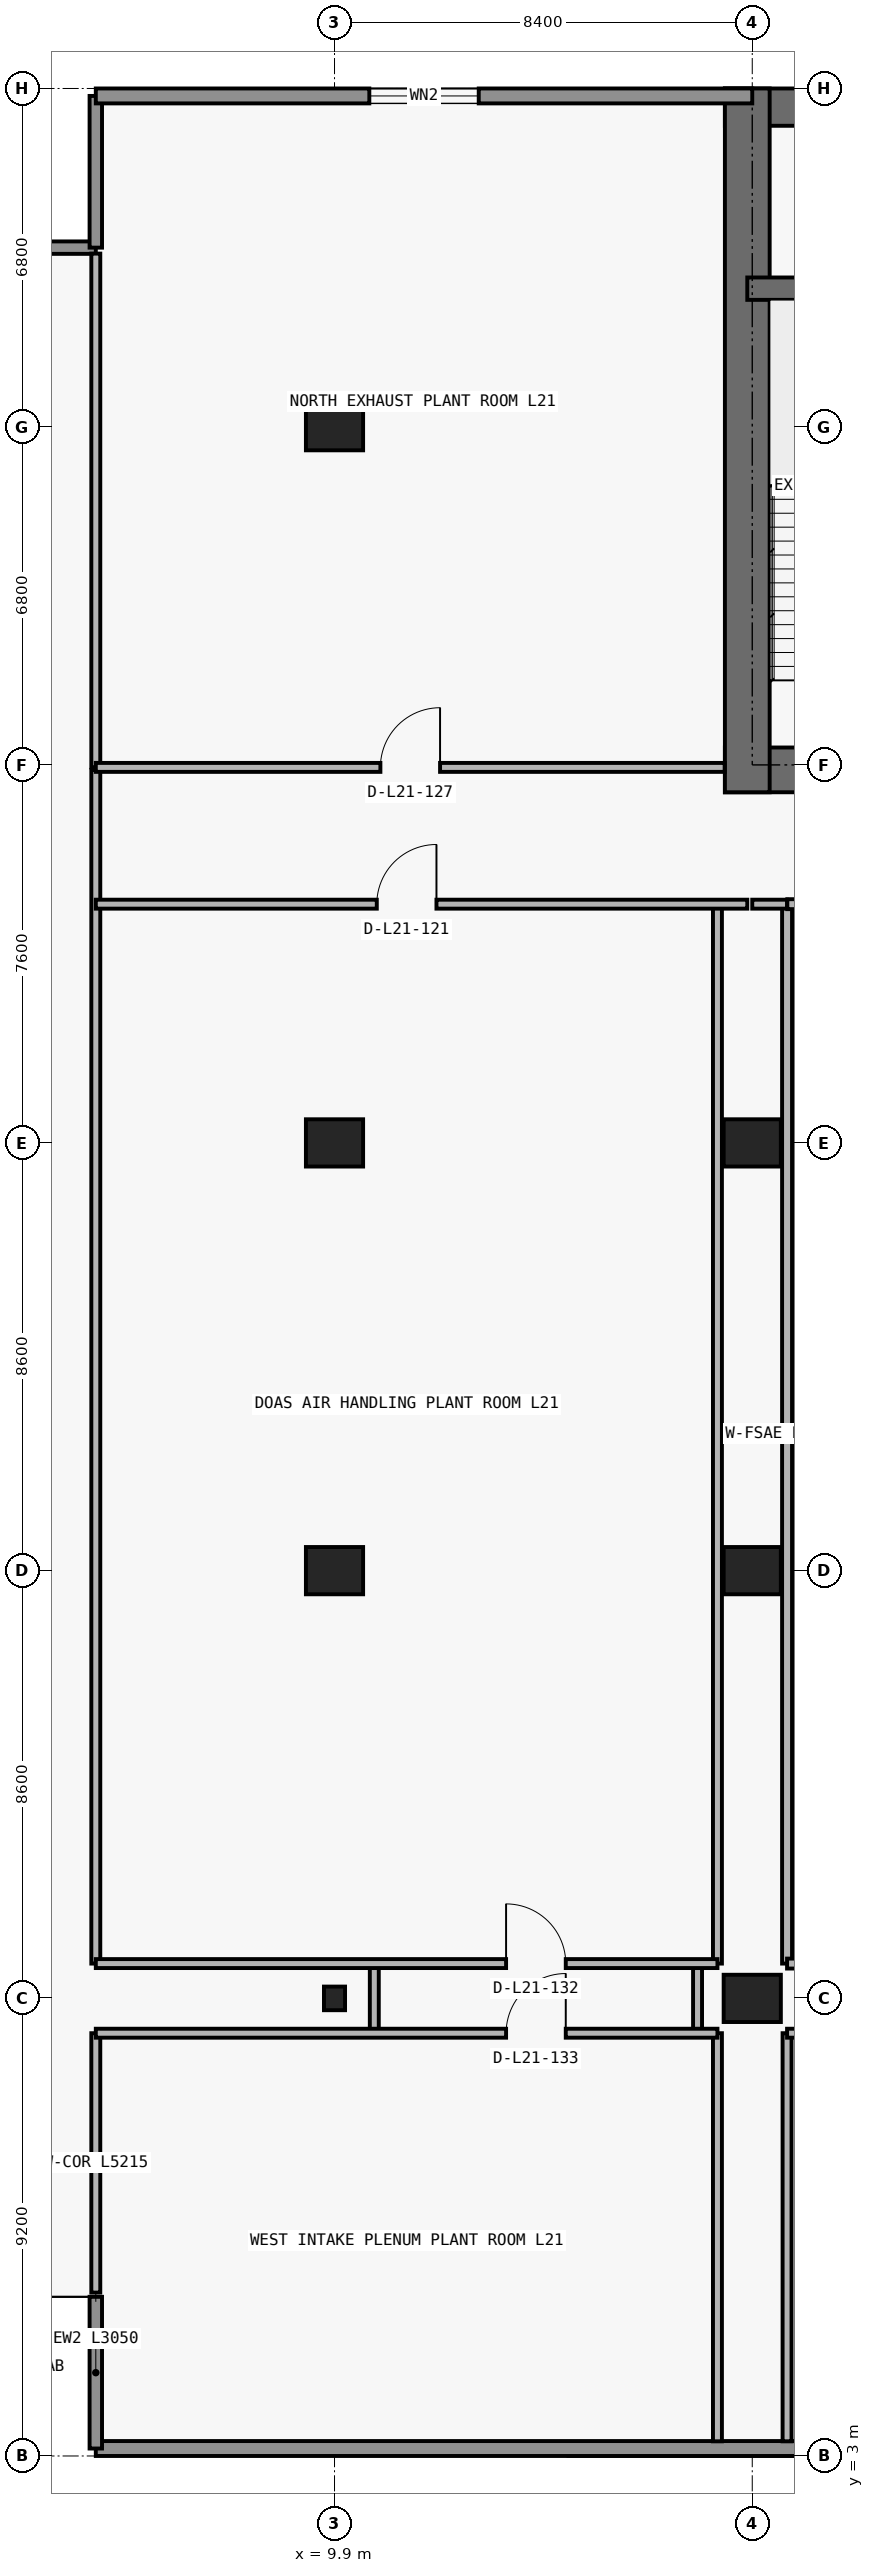
"""IFC4 building model, lengths in metres.
Left out: names, types, materials, properties, quantities, classifications, styles, units other than length and angle.
Written with IfcOpenShell. Run it as: python <this file> out.ifc"""

import sys

from ifc_helpers import new_model, si_unit, direction, frame, frame_2d, origin, origin_2d, place, context, subcontext, project, spatial, rectangle, i_section, extrude, element, fill, save


model = new_model("IFC4")
c1 = context("Model", 3, precision=1e-05, world=origin(), true_north=direction((0.0, 1.0)))
c2 = subcontext(c1, "Body", "Model", "MODEL_VIEW")
j1 = project(units=[si_unit("LENGTHUNIT", "METRE"), si_unit("PLANEANGLEUNIT", "RADIAN")], contexts=[c1])
p1 = place(None, origin())
s1 = spatial("IfcSite", under=j1, at=p1, CompositionType="ELEMENT")
p2 = place(p1, origin())
s2 = spatial("IfcBuilding", under=s1, at=p2, CompositionType="ELEMENT")
p3 = place(p2, frame((0.0, 0.0, 79.5)))
s3 = spatial("IfcBuildingStorey", under=s2, at=p3, CompositionType="ELEMENT", Elevation=79.5)
p4 = place(p3, frame((9.9, 12.2, 0.0), z_axis=(0.0, 0.0, 1.0), x_axis=(1.0, 0.0, 0.0)))
e1 = element("IfcColumn", 1, at=p4, inside=s3, PredefinedType="COLUMN", context=c2, shape_type="SweptSolid", body=[
    extrude(i_section(OverallWidth=0.424, OverallDepth=0.475, WebThickness=0.048, FlangeThickness=0.077, FilletRadius=0.015, at=origin_2d()), origin(), (0.0, 0.0, 1.0), 4.85),
])
for number, where, z_axis, x_axis in (
    (2, (18.3, 12.2, 0.0), (0.0, 0.0, 1.0), (1.0, 0.0, 0.0)),
    (3, (9.9, 20.8, 0.0), (0.0, 0.0, 1.0), (1.0, 0.0, 0.0)),
    (4, (18.3, 20.8, 0.0), (0.0, 0.0, 1.0), (1.0, 0.0, 0.0)),
    (5, (9.9, 29.4, 0.0), (0.0, 0.0, 1.0), (1.0, 0.0, 0.0)),
    (6, (18.3, 29.4, 0.0), (0.0, 0.0, 1.0), (1.0, 0.0, 0.0)),
    (7, (9.9, 43.8, 0.0), (0.0, 0.0, 1.0), (1.0, 0.0, 0.0)),
):
    element("IfcColumn", number, at=place(p3, frame(where, z_axis=z_axis, x_axis=x_axis)), inside=s3, PredefinedType="COLUMN", context=c2, shape_type="SweptSolid", body=[
        extrude(rectangle(XDim=1.15, YDim=0.95, at=origin_2d()), origin(), (0.0, 0.0, 1.0), 4.85),
    ])
p5 = place(p3, frame((17.75, 36.9, 0.0), z_axis=(0.0, 0.0, 1.0), x_axis=(1.0, 0.0, 0.0)))
e8 = element("IfcWall", 8, at=p5, inside=s3, PredefinedType="SHEAR", context=c2, shape_type="SweptSolid", body=[
    extrude(rectangle(XDim=42.3, YDim=0.9, at=frame_2d((21.15, 0.0))), origin(), (0.0, 0.0, 1.0), 4.85),
])
p6 = place(p5, frame((14.55, 0.0, 0.0)))
e9 = element("IfcOpeningElement", 9, at=p6, cuts=e8, PredefinedType="OPENING", context=c2, shape_type="SweptSolid", body=[
    extrude(rectangle(XDim=1.1, YDim=2.15, at=frame_2d((0.55, 1.075))), frame((0.0, 0.46, 0.0), z_axis=(0.0, -1.0, 0.0), x_axis=(1.0, 0.0, 0.0)), (0.0, 0.0, 1.0), 0.92),
])
p7 = place(p5, frame((6.4, 0.0, 0.0)))
e10 = element("IfcOpeningElement", 10, at=p7, cuts=e8, PredefinedType="OPENING", context=c2, shape_type="SweptSolid", body=[
    extrude(rectangle(XDim=1.05, YDim=2.15, at=frame_2d((0.525, 1.075))), frame((0.0, 0.46, 0.0), z_axis=(0.0, -1.0, 0.0), x_axis=(1.0, 0.0, 0.0)), (0.0, 0.0, 1.0), 0.92),
])
p8 = place(p5, frame((34.9, 0.0, 0.0)))
e11 = element("IfcOpeningElement", 11, at=p8, cuts=e8, PredefinedType="OPENING", context=c2, shape_type="SweptSolid", body=[
    extrude(rectangle(XDim=1.05, YDim=2.15, at=frame_2d((0.525, 1.075))), frame((0.0, 0.46, 0.0), z_axis=(0.0, -1.0, 0.0), x_axis=(1.0, 0.0, 0.0)), (0.0, 0.0, 1.0), 0.92),
])
p9 = place(p5, frame((11.012, 0.0, 0.0)))
e12 = element("IfcOpeningElement", 12, at=p9, cuts=e8, PredefinedType="OPENING", context=c2, shape_type="SweptSolid", body=[
    extrude(rectangle(XDim=1.05, YDim=2.15, at=frame_2d((0.525, 1.075))), frame((0.0, 0.46, 0.0), z_axis=(0.0, -1.0, 0.0), x_axis=(1.0, 0.0, 0.0)), (0.0, 0.0, 1.0), 0.92),
])
p10 = place(p5, frame((24.25, 0.0, 0.0)))
e13 = element("IfcOpeningElement", 13, at=p10, cuts=e8, PredefinedType="OPENING", context=c2, shape_type="SweptSolid", body=[
    extrude(rectangle(XDim=1.05, YDim=2.15, at=frame_2d((0.525, 1.075))), frame((0.0, 0.46, 0.0), z_axis=(0.0, -1.0, 0.0), x_axis=(1.0, 0.0, 0.0)), (0.0, 0.0, 1.0), 0.92),
])
p11 = place(p3, frame((17.75, 50.225, 0.0), z_axis=(0.0, 0.0, 1.0), x_axis=(1.0, 0.0, 0.0)))
e14 = element("IfcWall", 14, at=p11, inside=s3, PredefinedType="SHEAR", context=c2, shape_type="SweptSolid", body=[
    extrude(rectangle(XDim=42.3, YDim=0.75, at=frame_2d((21.15, 0.0))), origin(), (0.0, 0.0, 1.0), 4.85),
])
p12 = place(p3, frame((18.2, 36.45, 0.0), z_axis=(0.0, 0.0, 1.0), x_axis=(0.0, 1.0, 0.0)))
e15 = element("IfcWall", 15, at=p12, inside=s3, PredefinedType="SHEAR", context=c2, shape_type="SweptSolid", body=[
    extrude(rectangle(XDim=14.15, YDim=0.9, at=frame_2d((7.075, 0.0))), origin(), (0.0, 0.0, 1.0), 4.85),
])
p13 = place(p3, frame((18.2, 46.575, 0.0), z_axis=(0.0, 0.0, 1.0), x_axis=(1.0, 0.0, 0.0)))
e16 = element("IfcWall", 16, at=p13, inside=s3, PredefinedType="SHEAR", context=c2, shape_type="SweptSolid", body=[
    extrude(rectangle(XDim=41.4, YDim=0.45, at=frame_2d((20.7, 0.0))), origin(), (0.0, 0.0, 1.0), 4.85),
])
p14 = place(p13, frame((7.7, 0.0, 0.0)))
e17 = element("IfcOpeningElement", 17, at=p14, cuts=e16, PredefinedType="OPENING", context=c2, shape_type="SweptSolid", body=[
    extrude(rectangle(XDim=1.0, YDim=2.2, at=frame_2d((0.5, 1.1))), frame((0.0, 0.235, 0.0), z_axis=(0.0, -1.0, 0.0), x_axis=(1.0, 0.0, 0.0)), (0.0, 0.0, 1.0), 0.47),
])
p15 = place(p13, frame((32.725, 0.0, 0.0)))
e18 = element("IfcOpeningElement", 18, at=p15, cuts=e16, PredefinedType="OPENING", context=c2, shape_type="SweptSolid", body=[
    extrude(rectangle(XDim=1.05, YDim=2.15, at=frame_2d((0.525, 1.075))), frame((0.0, 0.235, 0.0), z_axis=(0.0, -1.0, 0.0), x_axis=(1.0, 0.0, 0.0)), (0.0, 0.0, 1.0), 0.47),
])
p16 = place(p3, frame((72.7, 3.15, 0.0), z_axis=(0.0, 0.0, 1.0), x_axis=(-1.0, 0.0, 0.0)))
e19 = element("IfcWall", 19, at=p16, inside=s3, PredefinedType="STANDARD", context=c2, shape_type="SweptSolid", body=[
    extrude(rectangle(XDim=67.6, YDim=0.3, at=frame_2d((33.8, 0.0))), origin(), (0.0, 0.0, 1.0), 4.85),
])
p17 = place(p3, frame((5.1, 6.2, 0.0), z_axis=(0.0, 0.0, 1.0), x_axis=(0.0, -1.0, 0.0)))
e20 = element("IfcWall", 20, at=p17, inside=s3, PredefinedType="ELEMENTEDWALL", context=c2, shape_type="SweptSolid", body=[
    extrude(rectangle(XDim=3.05, YDim=0.25, at=frame_2d((1.525, 0.0))), origin(), (0.0, 0.0, 1.0), 4.85),
])
p18 = place(p3, frame((1.65, 47.4, 0.0), z_axis=(0.0, 0.0, 1.0), x_axis=(1.0, 0.0, 0.0)))
e21 = element("IfcWall", 21, at=p18, inside=s3, PredefinedType="ELEMENTEDWALL", context=c2, shape_type="SweptSolid", body=[
    extrude(rectangle(XDim=3.45, YDim=0.25, at=frame_2d((1.725, 0.0))), origin(), (0.0, 0.0, 1.0), 4.85),
])
p19 = place(p3, frame((5.1, 47.4, 0.0), z_axis=(0.0, 0.0, 1.0), x_axis=(0.0, 1.0, 0.0)))
e22 = element("IfcWall", 22, at=p19, inside=s3, PredefinedType="ELEMENTEDWALL", context=c2, shape_type="SweptSolid", body=[
    extrude(rectangle(XDim=3.05, YDim=0.25, at=frame_2d((1.525, 0.0))), origin(), (0.0, 0.0, 1.0), 4.85),
])
p20 = place(p3, frame((5.1, 50.45, 0.0), z_axis=(0.0, 0.0, 1.0), x_axis=(1.0, 0.0, 0.0)))
e23 = element("IfcWall", 23, at=p20, inside=s3, PredefinedType="STANDARD", context=c2, shape_type="SweptSolid", body=[
    extrude(rectangle(XDim=13.2, YDim=0.3, at=frame_2d((6.6, 0.0))), origin(), (0.0, 0.0, 1.0), 4.85),
])
p21 = place(p20, frame((5.5, 0.0, 0.85)))
e24 = element("IfcOpeningElement", 24, at=p21, cuts=e23, PredefinedType="OPENING", context=c2, shape_type="SweptSolid", body=[
    extrude(rectangle(XDim=2.2, YDim=1.55, at=frame_2d((1.1, 0.775))), frame((0.0, 0.16, 0.0), z_axis=(0.0, -1.0, 0.0), x_axis=(1.0, 0.0, 0.0)), (0.0, 0.0, 1.0), 0.32),
])
p22 = place(p3, frame((5.1, 6.285, 0.0), z_axis=(0.0, 0.0, 1.0), x_axis=(0.0, 1.0, 0.0)))
e25 = element("IfcWall", 25, at=p22, inside=s3, PredefinedType="PARTITIONING", context=c2, shape_type="SweptSolid", body=[
    extrude(rectangle(XDim=5.215, YDim=0.18, at=frame_2d((2.607, 0.0))), origin(), (0.0, 0.0, 1.0), 4.85),
])
p23 = place(p3, frame((5.1, 12.9, 0.0), z_axis=(0.0, 0.0, 1.0), x_axis=(0.0, 1.0, 0.0)))
e26 = element("IfcWall", 26, at=p23, inside=s3, PredefinedType="PARTITIONING", context=c2, shape_type="SweptSolid", body=[
    extrude(rectangle(XDim=24.0, YDim=0.18, at=frame_2d((12.0, 0.0))), origin(), (0.0, 0.0, 1.0), 4.85),
])
p24 = place(p3, frame((5.1, 36.95, 0.0), z_axis=(0.0, 0.0, 1.0), x_axis=(0.0, 1.0, 0.0)))
e27 = element("IfcWall", 27, at=p24, inside=s3, PredefinedType="PARTITIONING", context=c2, shape_type="SweptSolid", body=[
    extrude(rectangle(XDim=10.33, YDim=0.18, at=frame_2d((5.165, 0.0))), origin(), (0.0, 0.0, 1.0), 4.85),
])
for number, where, z_axis, x_axis in (
    (28, (10.7, 11.5, 0.0), (0.0, 0.0, 1.0), (0.0, 1.0, 0.0)),
    (29, (17.2, 11.5, 0.0), (0.0, 0.0, 1.0), (0.0, 1.0, 0.0)),
):
    element("IfcWall", number, at=place(p3, frame(where, z_axis=z_axis, x_axis=x_axis)), inside=s3, PredefinedType="PARTITIONING", context=c2, shape_type="SweptSolid", body=[
        extrude(rectangle(XDim=1.4, YDim=0.18, at=frame_2d((0.7, 0.0))), origin(), (0.0, 0.0, 1.0), 4.85),
    ])
p25 = place(p3, frame((17.6, 3.295, 0.0), z_axis=(0.0, 0.0, 1.0), x_axis=(0.0, 1.0, 0.0)))
e30 = element("IfcWall", 30, at=p25, inside=s3, PredefinedType="PARTITIONING", context=c2, shape_type="SweptSolid", body=[
    extrude(rectangle(XDim=8.205, YDim=0.18, at=frame_2d((4.103, 0.0))), origin(), (0.0, 0.0, 1.0), 4.85),
])
p26 = place(p3, frame((17.6, 12.9, 0.0), z_axis=(0.0, 0.0, 1.0), x_axis=(0.0, 1.0, 0.0)))
e31 = element("IfcWall", 31, at=p26, inside=s3, PredefinedType="PARTITIONING", context=c2, shape_type="SweptSolid", body=[
    extrude(rectangle(XDim=21.3, YDim=0.18, at=frame_2d((10.65, 0.0))), origin(), (0.0, 0.0, 1.0), 4.85),
])
p27 = place(p3, frame((19.0, 3.295, 0.0), z_axis=(0.0, 0.0, 1.0), x_axis=(0.0, 1.0, 0.0)))
e32 = element("IfcWall", 32, at=p27, inside=s3, PredefinedType="PARTITIONING", context=c2, shape_type="SweptSolid", body=[
    extrude(rectangle(XDim=8.205, YDim=0.18, at=frame_2d((4.103, 0.0))), origin(), (0.0, 0.0, 1.0), 4.85),
])
p28 = place(p3, frame((19.0, 12.9, 0.0), z_axis=(0.0, 0.0, 1.0), x_axis=(0.0, 1.0, 0.0)))
e33 = element("IfcWall", 33, at=p28, inside=s3, PredefinedType="PARTITIONING", context=c2, shape_type="SweptSolid", body=[
    extrude(rectangle(XDim=21.3, YDim=0.2, at=frame_2d((10.65, 0.0))), origin(), (0.0, 0.0, 1.0), 4.85),
])
p29 = place(p3, frame((5.1, 11.5, 0.0), z_axis=(0.0, 0.0, 1.0), x_axis=(1.0, 0.0, 0.0)))
e34 = element("IfcWall", 34, at=p29, inside=s3, PredefinedType="PARTITIONING", context=c2, shape_type="SweptSolid", body=[
    extrude(rectangle(XDim=12.5, YDim=0.18, at=frame_2d((6.25, 0.0))), origin(), (0.0, 0.0, 1.0), 4.85),
])
p30 = place(p29, frame((8.25, 0.0, 0.0)))
e35 = element("IfcOpeningElement", 35, at=p30, cuts=e34, PredefinedType="OPENING", context=c2, shape_type="SweptSolid", body=[
    extrude(rectangle(XDim=1.2, YDim=2.2, at=frame_2d((0.6, 1.1))), frame((0.0, 0.1, 0.0), z_axis=(0.0, -1.0, 0.0), x_axis=(1.0, 0.0, 0.0)), (0.0, 0.0, 1.0), 0.2),
])
p31 = place(p3, frame((19.0, 11.5, 0.0), z_axis=(0.0, 0.0, 1.0), x_axis=(1.0, 0.0, 0.0)))
e36 = element("IfcWall", 36, at=p31, inside=s3, PredefinedType="PARTITIONING", context=c2, shape_type="SweptSolid", body=[
    extrude(rectangle(XDim=39.8, YDim=0.18, at=frame_2d((19.9, 0.0))), origin(), (0.0, 0.0, 1.0), 4.85),
])
p32 = place(p31, frame((19.3, 0.0, 0.0)))
e37 = element("IfcOpeningElement", 37, at=p32, cuts=e36, PredefinedType="OPENING", context=c2, shape_type="SweptSolid", body=[
    extrude(rectangle(XDim=1.2, YDim=2.2, at=frame_2d((0.6, 1.1))), frame((0.0, 0.1, 0.0), z_axis=(0.0, -1.0, 0.0), x_axis=(1.0, 0.0, 0.0)), (0.0, 0.0, 1.0), 0.2),
])
p33 = place(p3, frame((5.1, 12.9, 0.0), z_axis=(0.0, 0.0, 1.0), x_axis=(1.0, 0.0, 0.0)))
e38 = element("IfcWall", 38, at=p33, inside=s3, PredefinedType="PARTITIONING", context=c2, shape_type="SweptSolid", body=[
    extrude(rectangle(XDim=12.5, YDim=0.18, at=frame_2d((6.25, 0.0))), origin(), (0.0, 0.0, 1.0), 4.85),
])
p34 = place(p33, frame((8.25, 0.0, 0.0)))
e39 = element("IfcOpeningElement", 39, at=p34, cuts=e38, PredefinedType="OPENING", context=c2, shape_type="SweptSolid", body=[
    extrude(rectangle(XDim=1.2, YDim=2.2, at=frame_2d((0.6, 1.1))), frame((0.0, 0.1, 0.0), z_axis=(0.0, -1.0, 0.0), x_axis=(1.0, 0.0, 0.0)), (0.0, 0.0, 1.0), 0.2),
])
p35 = place(p3, frame((19.0, 12.9, 0.0), z_axis=(0.0, 0.0, 1.0), x_axis=(1.0, 0.0, 0.0)))
e40 = element("IfcWall", 40, at=p35, inside=s3, PredefinedType="PARTITIONING", context=c2, shape_type="SweptSolid", body=[
    extrude(rectangle(XDim=16.1, YDim=0.2, at=frame_2d((8.05, 0.0))), origin(), (0.0, 0.0, 1.0), 4.85),
])
p36 = place(p3, frame((5.1, 34.2, 0.0), z_axis=(0.0, 0.0, 1.0), x_axis=(1.0, 0.0, 0.0)))
e41 = element("IfcWall", 41, at=p36, inside=s3, PredefinedType="PARTITIONING", context=c2, shape_type="SweptSolid", body=[
    extrude(rectangle(XDim=13.1, YDim=0.18, at=frame_2d((6.55, 0.0))), origin(), (0.0, 0.0, 1.0), 4.85),
])
p37 = place(p36, frame((5.65, 0.0, 0.0)))
e42 = element("IfcOpeningElement", 42, at=p37, cuts=e41, PredefinedType="OPENING", context=c2, shape_type="SweptSolid", body=[
    extrude(rectangle(XDim=1.2, YDim=2.2, at=frame_2d((0.6, 1.1))), frame((0.0, 0.1, 0.0), z_axis=(0.0, -1.0, 0.0), x_axis=(1.0, 0.0, 0.0)), (0.0, 0.0, 1.0), 0.2),
])
p38 = place(p3, frame((18.3, 34.2, 0.0), z_axis=(0.0, 0.0, 1.0), x_axis=(1.0, 0.0, 0.0)))
e43 = element("IfcWall", 43, at=p38, inside=s3, PredefinedType="PARTITIONING", context=c2, shape_type="SweptSolid", body=[
    extrude(rectangle(XDim=0.7, YDim=0.18, at=frame_2d((0.35, 0.0))), origin(), (0.0, 0.0, 1.0), 4.85),
])
p39 = place(p3, frame((19.005, 34.2, 0.0), z_axis=(0.0, 0.0, 1.0), x_axis=(1.0, 0.0, 0.0)))
e44 = element("IfcWall", 44, at=p39, inside=s3, PredefinedType="PARTITIONING", context=c2, shape_type="SweptSolid", body=[
    extrude(rectangle(XDim=16.095, YDim=0.2, at=frame_2d((8.048, 0.0))), origin(), (0.0, 0.0, 1.0), 4.85),
])
p40 = place(p39, frame((7.522, 0.0, 0.0)))
e45 = element("IfcOpeningElement", 45, at=p40, cuts=e44, PredefinedType="OPENING", context=c2, shape_type="SweptSolid", body=[
    extrude(rectangle(XDim=1.05, YDim=2.15, at=frame_2d((0.525, 1.075))), frame((0.0, 0.11, 0.0), z_axis=(0.0, -1.0, 0.0), x_axis=(1.0, 0.0, 0.0)), (0.0, 0.0, 1.0), 0.22),
])
p41 = place(p3, frame((5.1, 36.95, 0.0), z_axis=(0.0, 0.0, 1.0), x_axis=(1.0, 0.0, 0.0)))
e46 = element("IfcWall", 46, at=p41, inside=s3, PredefinedType="PARTITIONING", context=c2, shape_type="SweptSolid", body=[
    extrude(rectangle(XDim=12.645, YDim=0.18, at=frame_2d((6.323, 0.0))), origin(), (0.0, 0.0, 1.0), 4.85),
])
p42 = place(p41, frame((5.722, 0.0, 0.0)))
e47 = element("IfcOpeningElement", 47, at=p42, cuts=e46, PredefinedType="OPENING", context=c2, shape_type="SweptSolid", body=[
    extrude(rectangle(XDim=1.2, YDim=2.2, at=frame_2d((0.6, 1.1))), frame((0.0, 0.1, 0.0), z_axis=(0.0, -1.0, 0.0), x_axis=(1.0, 0.0, 0.0)), (0.0, 0.0, 1.0), 0.2),
])
p43 = place(p21, origin())
e48 = element("IfcWindow", 48, at=p43, inside=s3, PartitioningType="SINGLE_PANEL", PredefinedType="WINDOW", context=c2, shape_type="SweptSolid", body=[
    extrude(rectangle(XDim=2.2, YDim=1.55, at=frame_2d((1.1, 0.775))), frame((0.0, 0.03, 0.0), z_axis=(0.0, -1.0, 0.0), x_axis=(1.0, 0.0, 0.0)), (0.0, 0.0, 1.0), 0.06),
])
fill(e24, e48)
p44 = place(p37, origin())
e49 = element("IfcDoor", 49, at=p44, inside=s3, OperationType="SINGLE_SWING_RIGHT", PredefinedType="DOOR", context=c2, shape_type="SweptSolid", body=[
    extrude(rectangle(XDim=1.2, YDim=2.2, at=frame_2d((0.6, 1.1))), frame((0.0, 0.025, 0.0), z_axis=(0.0, -1.0, 0.0), x_axis=(1.0, 0.0, 0.0)), (0.0, 0.0, 1.0), 0.05),
])
fill(e42, e49)
p45 = place(p42, origin())
e50 = element("IfcDoor", 50, at=p45, inside=s3, OperationType="SINGLE_SWING_RIGHT", PredefinedType="DOOR", context=c2, shape_type="SweptSolid", body=[
    extrude(rectangle(XDim=1.2, YDim=2.2, at=frame_2d((0.6, 1.1))), frame((0.0, 0.025, 0.0), z_axis=(0.0, -1.0, 0.0), x_axis=(1.0, 0.0, 0.0)), (0.0, 0.0, 1.0), 0.05),
])
fill(e47, e50)
p46 = place(p34, origin())
e51 = element("IfcDoor", 51, at=p46, inside=s3, OperationType="SINGLE_SWING_LEFT", PredefinedType="DOOR", context=c2, shape_type="SweptSolid", body=[
    extrude(rectangle(XDim=1.2, YDim=2.2, at=frame_2d((0.6, 1.1))), frame((0.0, 0.025, 0.0), z_axis=(0.0, -1.0, 0.0), x_axis=(1.0, 0.0, 0.0)), (0.0, 0.0, 1.0), 0.05),
])
fill(e39, e51)
p47 = place(p30, origin())
e52 = element("IfcDoor", 52, at=p47, inside=s3, OperationType="SINGLE_SWING_RIGHT", PredefinedType="DOOR", context=c2, shape_type="SweptSolid", body=[
    extrude(rectangle(XDim=1.2, YDim=2.2, at=frame_2d((0.6, 1.1))), frame((0.0, 0.025, 0.0), z_axis=(0.0, -1.0, 0.0), x_axis=(1.0, 0.0, 0.0)), (0.0, 0.0, 1.0), 0.05),
])
fill(e35, e52)
save(model, sys.argv[1])
